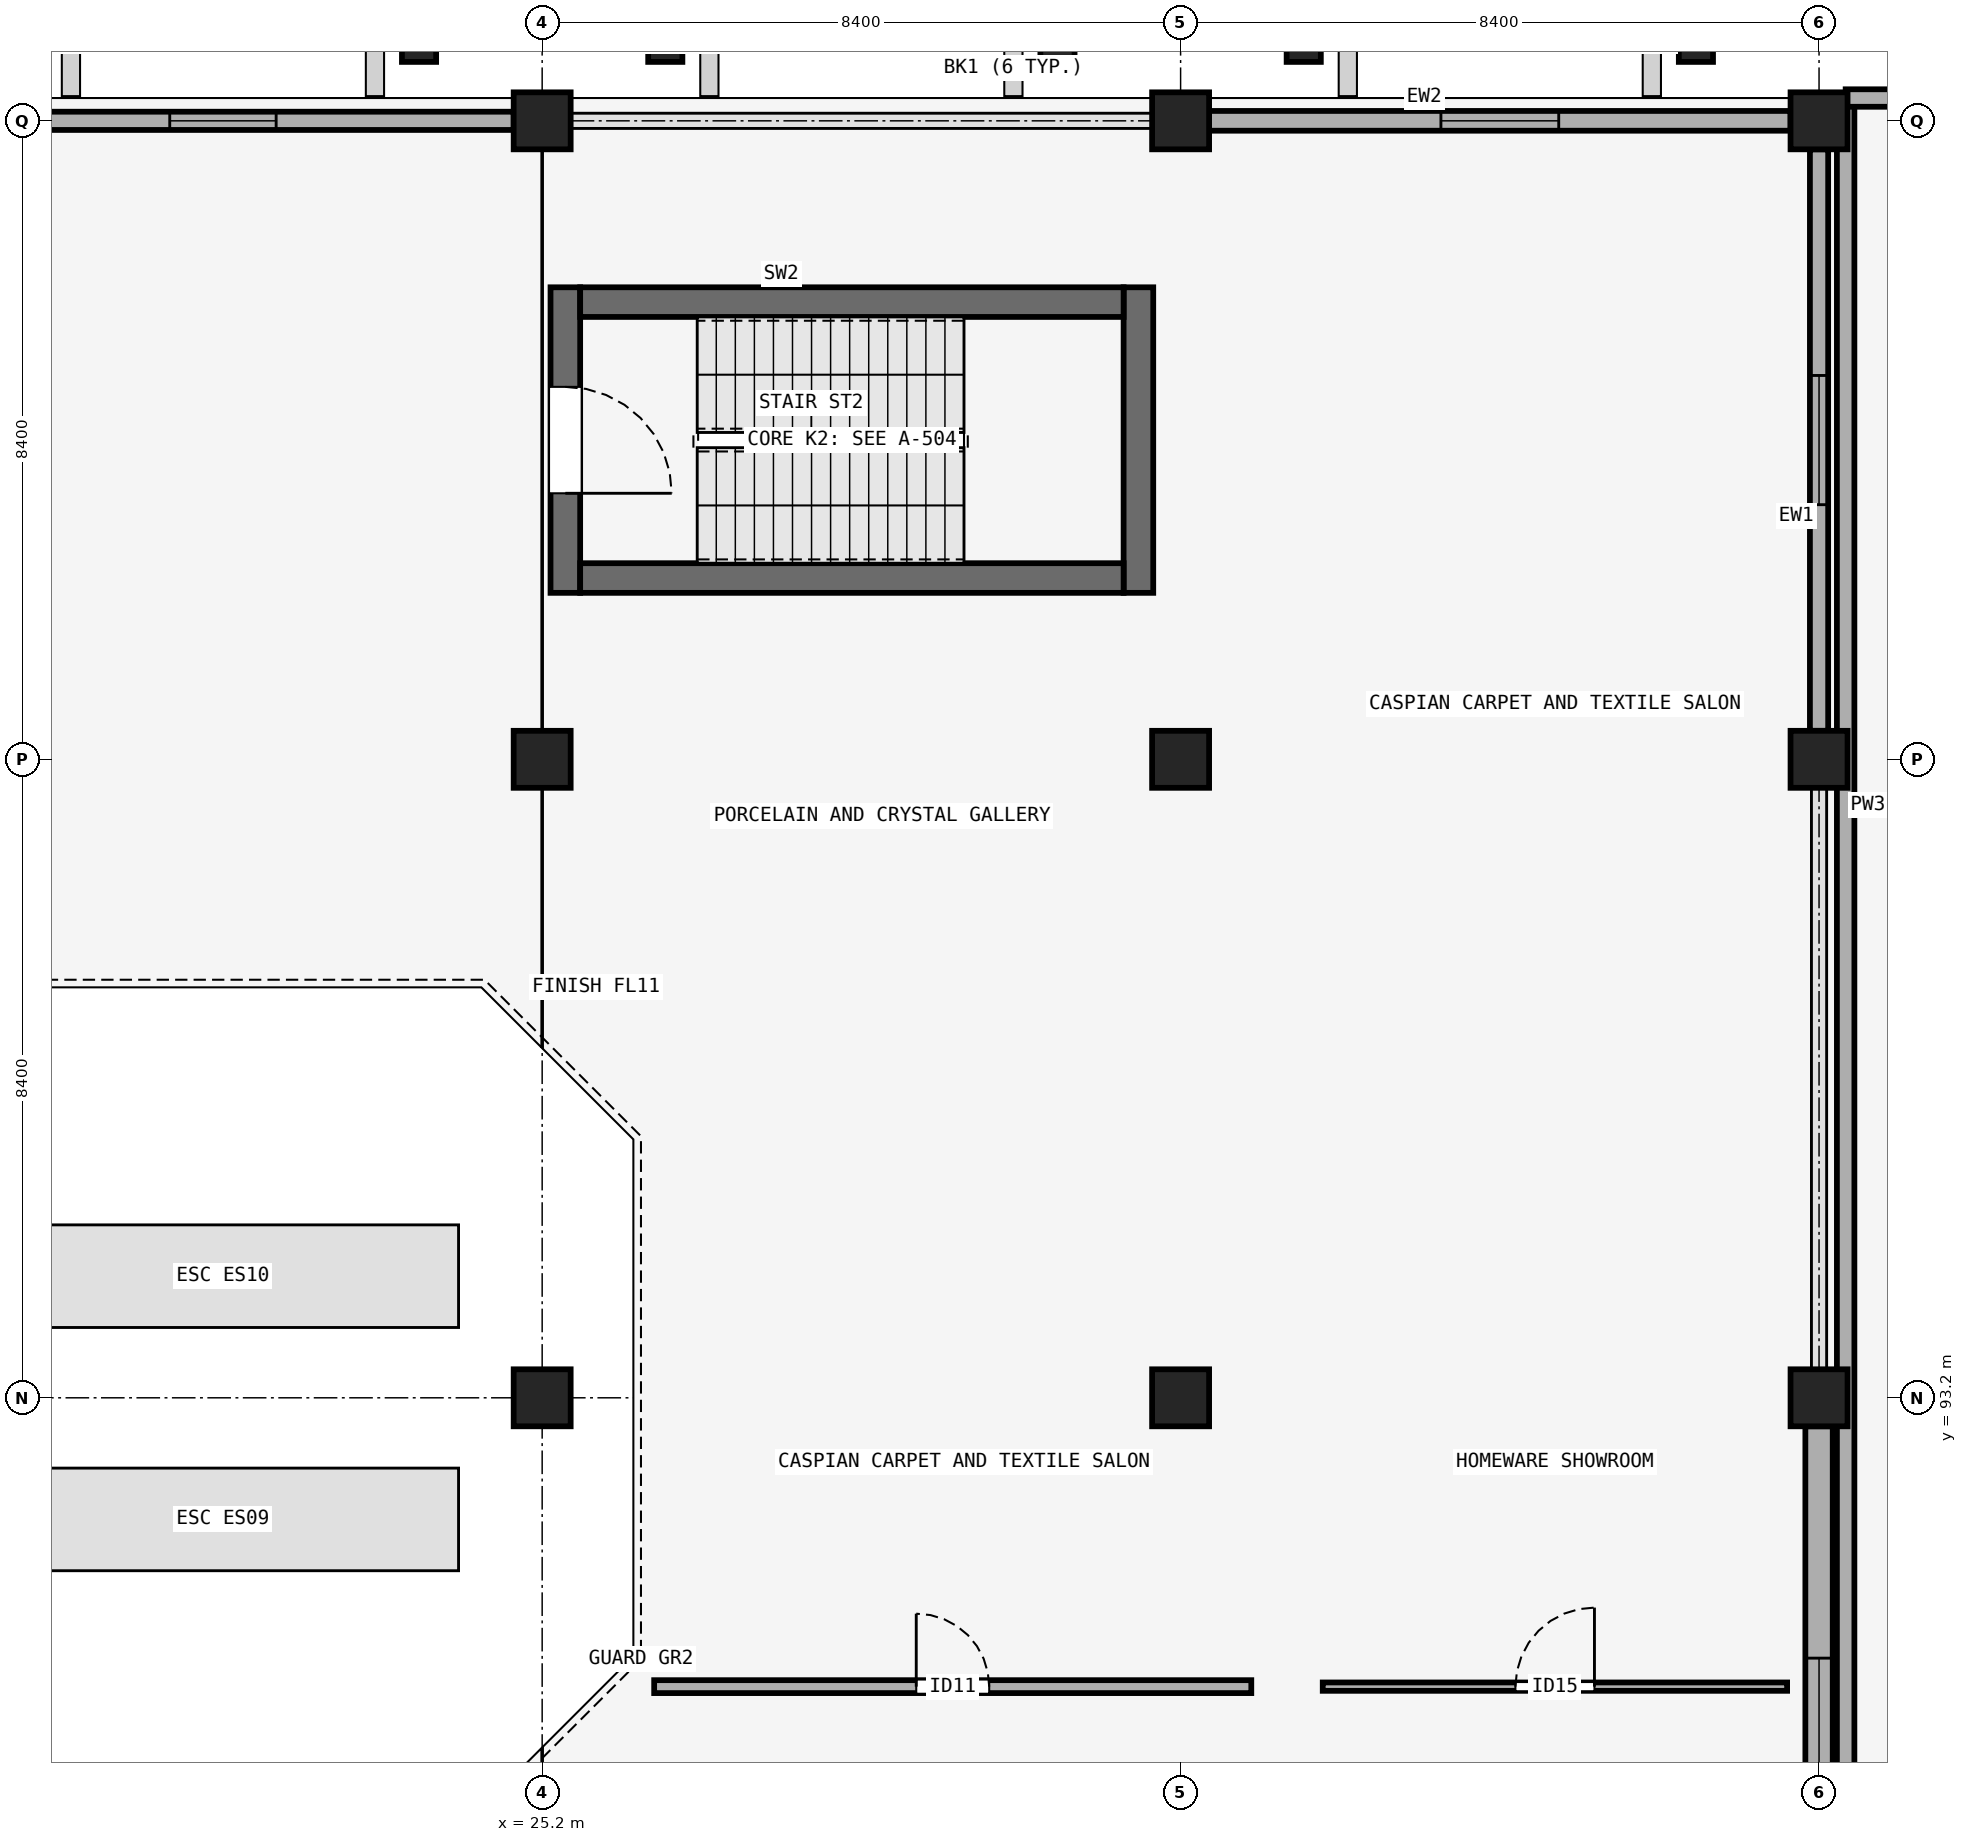
"""IFC4 building model, lengths in metres.
Left out: names, types, materials, properties, quantities, classifications, styles, units other than length and angle.
Written with IfcOpenShell. Run it as: python <this file> out.ifc"""

import sys

from ifc_helpers import new_model, si_unit, direction, frame, frame_2d, origin, origin_2d, place, context, subcontext, project, spatial, rectangle, extrude, element, fill, save


model = new_model("IFC4")
c1 = context("Model", 3, precision=1e-05, world=origin(), true_north=direction((0.0, 1.0)))
c2 = subcontext(c1, "Body", "Model", "MODEL_VIEW")
j1 = project(units=[si_unit("LENGTHUNIT", "METRE"), si_unit("PLANEANGLEUNIT", "RADIAN")], contexts=[c1])
p1 = place(None, origin())
s1 = spatial("IfcSite", under=j1, at=p1, CompositionType="ELEMENT")
p2 = place(p1, origin())
s2 = spatial("IfcBuilding", under=s1, at=p2, CompositionType="ELEMENT")
p3 = place(p2, frame((0.0, 0.0, 18.9)))
s3 = spatial("IfcBuildingStorey", under=s2, at=p3, CompositionType="ELEMENT", Elevation=18.9)
for number, where, z_axis, x_axis in (
    (1, (25.2, 93.2, 0.0), (0.0, 0.0, 1.0), (1.0, 0.0, 0.0)),
    (2, (33.6, 93.2, 0.0), (0.0, 0.0, 1.0), (1.0, 0.0, 0.0)),
    (3, (42.0, 93.2, 0.0), (0.0, 0.0, 1.0), (1.0, 0.0, 0.0)),
    (4, (25.2, 101.6, 0.0), (0.0, 0.0, 1.0), (1.0, 0.0, 0.0)),
    (5, (33.6, 101.6, 0.0), (0.0, 0.0, 1.0), (1.0, 0.0, 0.0)),
    (6, (42.0, 101.6, 0.0), (0.0, 0.0, 1.0), (1.0, 0.0, 0.0)),
    (7, (25.2, 110.0, 0.0), (0.0, 0.0, 1.0), (1.0, 0.0, 0.0)),
    (8, (33.6, 110.0, 0.0), (0.0, 0.0, 1.0), (1.0, 0.0, 0.0)),
    (9, (42.0, 110.0, 0.0), (0.0, 0.0, 1.0), (1.0, 0.0, 0.0)),
):
    element("IfcColumn", number, at=place(p3, frame(where, z_axis=z_axis, x_axis=x_axis)), inside=s3, PredefinedType="COLUMN", context=c2, shape_type="SweptSolid", body=[
        extrude(rectangle(XDim=0.75, YDim=0.75, at=origin_2d()), origin(), (0.0, 0.0, 1.0), 4.5),
    ])
for number, where, z_axis, x_axis in (
    (10, (23.58, 111.05, 0.0), (0.0, 0.0, 1.0), (1.0, 0.0, 0.0)),
    (11, (26.82, 111.05, 0.0), (0.0, 0.0, 1.0), (1.0, 0.0, 0.0)),
    (12, (31.98, 111.05, 0.0), (0.0, 0.0, 1.0), (1.0, 0.0, 0.0)),
    (13, (35.22, 111.05, 0.0), (0.0, 0.0, 1.0), (1.0, 0.0, 0.0)),
    (14, (40.38, 111.05, 0.0), (0.0, 0.0, 1.0), (1.0, 0.0, 0.0)),
):
    element("IfcColumn", number, at=place(p3, frame(where, z_axis=z_axis, x_axis=x_axis)), inside=s3, PredefinedType="PILASTER", context=c2, shape_type="SweptSolid", body=[
        extrude(rectangle(XDim=0.45, YDim=0.55, at=origin_2d()), origin(), (0.0, 0.0, 1.0), 4.5),
    ])
p4 = place(p3, frame((17.175, 110.0, 0.0), z_axis=(0.0, 0.0, 1.0), x_axis=(1.0, 0.0, 0.0)))
e15 = element("IfcWall", 15, at=p4, inside=s3, PredefinedType="SOLIDWALL", context=c2, shape_type="SweptSolid", body=[
    extrude(rectangle(XDim=7.65, YDim=0.24, at=frame_2d((3.825, 0.0))), origin(), (0.0, 0.0, 1.0), 3.45),
])
p5 = place(p4, frame((3.125, 0.0, 0.95)))
e16 = element("IfcOpeningElement", 16, at=p5, cuts=e15, PredefinedType="OPENING", context=c2, shape_type="SweptSolid", body=[
    extrude(rectangle(XDim=1.4, YDim=2.1, at=frame_2d((0.7, 1.05))), frame((0.0, 0.13, 0.0), z_axis=(0.0, -1.0, 0.0), x_axis=(1.0, 0.0, 0.0)), (0.0, 0.0, 1.0), 0.26),
])
p6 = place(p3, frame((33.975, 110.0, 0.0), z_axis=(0.0, 0.0, 1.0), x_axis=(1.0, 0.0, 0.0)))
e17 = element("IfcWall", 17, at=p6, inside=s3, PredefinedType="SOLIDWALL", context=c2, shape_type="SweptSolid", body=[
    extrude(rectangle(XDim=7.65, YDim=0.26, at=frame_2d((3.825, 0.0))), origin(), (0.0, 0.0, 1.0), 3.45),
])
p7 = place(p6, frame((3.05, 0.0, 0.95)))
e18 = element("IfcOpeningElement", 18, at=p7, cuts=e17, PredefinedType="OPENING", context=c2, shape_type="SweptSolid", body=[
    extrude(rectangle(XDim=1.55, YDim=1.35, at=frame_2d((0.775, 0.675))), frame((0.0, 0.14, 0.0), z_axis=(0.0, -1.0, 0.0), x_axis=(1.0, 0.0, 0.0)), (0.0, 0.0, 1.0), 0.28),
])
p8 = place(p3, frame((42.0, 85.175, 0.0), z_axis=(0.0, 0.0, 1.0), x_axis=(0.0, 1.0, 0.0)))
e19 = element("IfcWall", 19, at=p8, inside=s3, PredefinedType="SOLIDWALL", context=c2, shape_type="SweptSolid", body=[
    extrude(rectangle(XDim=7.65, YDim=0.36, at=frame_2d((3.825, 0.0))), origin(), (0.0, 0.0, 1.0), 3.45),
])
p9 = place(p8, frame((3.05, 0.0, 0.95)))
e20 = element("IfcOpeningElement", 20, at=p9, cuts=e19, PredefinedType="OPENING", context=c2, shape_type="SweptSolid", body=[
    extrude(rectangle(XDim=1.55, YDim=2.1, at=frame_2d((0.775, 1.05))), frame((0.0, 0.19, 0.0), z_axis=(0.0, -1.0, 0.0), x_axis=(1.0, 0.0, 0.0)), (0.0, 0.0, 1.0), 0.38),
])
p10 = place(p3, frame((42.0, 101.975, 0.0), z_axis=(0.0, 0.0, 1.0), x_axis=(0.0, 1.0, 0.0)))
e21 = element("IfcWall", 21, at=p10, inside=s3, PredefinedType="SOLIDWALL", context=c2, shape_type="SweptSolid", body=[
    extrude(rectangle(XDim=7.65, YDim=0.24, at=frame_2d((3.825, 0.0))), origin(), (0.0, 0.0, 1.0), 3.45),
])
p11 = place(p10, frame((2.975, 0.0, 0.95)))
e22 = element("IfcOpeningElement", 22, at=p11, cuts=e21, PredefinedType="OPENING", context=c2, shape_type="SweptSolid", body=[
    extrude(rectangle(XDim=1.7, YDim=1.35, at=frame_2d((0.85, 0.675))), frame((0.0, 0.13, 0.0), z_axis=(0.0, -1.0, 0.0), x_axis=(1.0, 0.0, 0.0)), (0.0, 0.0, 1.0), 0.26),
])
p12 = place(p3, frame((42.35, 110.3, 0.0), z_axis=(0.0, 0.0, 1.0), x_axis=(0.0, -1.0, 0.0)))
e23 = element("IfcWall", 23, at=p12, inside=s3, PredefinedType="PARAPET", context=c2, shape_type="SweptSolid", body=[
    extrude(rectangle(XDim=25.15, YDim=0.23, at=frame_2d((12.575, 0.0))), origin(), (0.0, 0.0, 1.0), 0.95),
])
p13 = place(p3, frame((50.7, 110.3, 0.0), z_axis=(0.0, 0.0, 1.0), x_axis=(-1.0, 0.0, 0.0)))
e24 = element("IfcWall", 24, at=p13, inside=s3, PredefinedType="PARAPET", context=c2, shape_type="SweptSolid", body=[
    extrude(rectangle(XDim=8.35, YDim=0.23, at=frame_2d((4.175, 0.0))), origin(), (0.0, 0.0, 1.0), 0.95),
])
p14 = place(p3, frame((25.505, 107.81, 0.0), z_axis=(0.0, 0.0, 1.0), x_axis=(0.0, -1.0, 0.0)))
e25 = element("IfcWall", 25, at=p14, inside=s3, PredefinedType="SHEAR", context=c2, shape_type="SweptSolid", body=[
    extrude(rectangle(XDim=4.02, YDim=0.39, at=frame_2d((2.01, 0.0))), origin(), (0.0, 0.0, 1.0), 4.2),
])
p15 = place(p14, frame((1.31, 0.0, 0.0)))
e26 = element("IfcOpeningElement", 26, at=p15, cuts=e25, PredefinedType="OPENING", context=c2, shape_type="SweptSolid", body=[
    extrude(rectangle(XDim=1.4, YDim=2.15, at=frame_2d((0.7, 1.075))), frame((0.0, 0.205, 0.0), z_axis=(0.0, -1.0, 0.0), x_axis=(1.0, 0.0, 0.0)), (0.0, 0.0, 1.0), 0.41),
])
p16 = place(p3, frame((33.045, 103.79, 0.0), z_axis=(0.0, 0.0, 1.0), x_axis=(0.0, 1.0, 0.0)))
e27 = element("IfcWall", 27, at=p16, inside=s3, PredefinedType="SHEAR", context=c2, shape_type="SweptSolid", body=[
    extrude(rectangle(XDim=4.02, YDim=0.39, at=frame_2d((2.01, 0.0))), origin(), (0.0, 0.0, 1.0), 4.2),
])
for number, where, z_axis, x_axis in (
    (28, (25.7, 103.985, 0.0), (0.0, 0.0, 1.0), (1.0, 0.0, 0.0)),
    (29, (25.7, 107.615, 0.0), (0.0, 0.0, 1.0), (1.0, 0.0, 0.0)),
):
    element("IfcWall", number, at=place(p3, frame(where, z_axis=z_axis, x_axis=x_axis)), inside=s3, PredefinedType="SHEAR", context=c2, shape_type="SweptSolid", body=[
        extrude(rectangle(XDim=7.15, YDim=0.39, at=frame_2d((3.575, 0.0))), origin(), (0.0, 0.0, 1.0), 4.2),
    ])
p17 = place(p3, frame((26.674, 89.4, 0.0), z_axis=(0.0, 0.0, 1.0), x_axis=(1.0, 0.0, 0.0)))
e30 = element("IfcWall", 30, at=p17, inside=s3, PredefinedType="PARTITIONING", context=c2, shape_type="SweptSolid", body=[
    extrude(rectangle(XDim=7.856, YDim=0.17, at=frame_2d((3.928, 0.0))), origin(), (0.0, 0.0, 1.0), 3.45),
])
p18 = place(p17, frame((3.448, 0.0, 0.0)))
e31 = element("IfcOpeningElement", 31, at=p18, cuts=e30, PredefinedType="OPENING", context=c2, shape_type="SweptSolid", body=[
    extrude(rectangle(XDim=0.96, YDim=2.1, at=frame_2d((0.48, 1.05))), frame((0.0, 0.095, 0.0), z_axis=(0.0, -1.0, 0.0), x_axis=(1.0, 0.0, 0.0)), (0.0, 0.0, 1.0), 0.19),
])
p19 = place(p3, frame((35.47, 89.4, 0.0), z_axis=(0.0, 0.0, 1.0), x_axis=(1.0, 0.0, 0.0)))
e32 = element("IfcWall", 32, at=p19, inside=s3, PredefinedType="PARTITIONING", context=c2, shape_type="SweptSolid", body=[
    extrude(rectangle(XDim=6.11, YDim=0.11, at=frame_2d((3.055, 0.0))), origin(), (0.0, 0.0, 1.0), 4.2),
])
p20 = place(p19, frame((2.535, 0.0, 0.0)))
e33 = element("IfcOpeningElement", 33, at=p20, cuts=e32, PredefinedType="OPENING", context=c2, shape_type="SweptSolid", body=[
    extrude(rectangle(XDim=1.04, YDim=2.1, at=frame_2d((0.52, 1.05))), frame((0.0, 0.065, 0.0), z_axis=(0.0, -1.0, 0.0), x_axis=(1.0, 0.0, 0.0)), (0.0, 0.0, 1.0), 0.13),
])
p21 = place(p5, origin())
e34 = element("IfcWindow", 34, at=p21, inside=s3, PartitioningType="SINGLE_PANEL", PredefinedType="WINDOW", context=c2, shape_type="SweptSolid", body=[
    extrude(rectangle(XDim=1.4, YDim=2.1, at=frame_2d((0.7, 1.05))), frame((0.0, 0.03, 0.0), z_axis=(0.0, -1.0, 0.0), x_axis=(1.0, 0.0, 0.0)), (0.0, 0.0, 1.0), 0.06),
])
fill(e16, e34)
p22 = place(p7, origin())
e35 = element("IfcWindow", 35, at=p22, inside=s3, PartitioningType="SINGLE_PANEL", PredefinedType="WINDOW", context=c2, shape_type="SweptSolid", body=[
    extrude(rectangle(XDim=1.55, YDim=1.35, at=frame_2d((0.775, 0.675))), frame((0.0, 0.03, 0.0), z_axis=(0.0, -1.0, 0.0), x_axis=(1.0, 0.0, 0.0)), (0.0, 0.0, 1.0), 0.06),
])
fill(e18, e35)
p23 = place(p9, origin())
e36 = element("IfcWindow", 36, at=p23, inside=s3, PartitioningType="SINGLE_PANEL", PredefinedType="WINDOW", context=c2, shape_type="SweptSolid", body=[
    extrude(rectangle(XDim=1.55, YDim=2.1, at=frame_2d((0.775, 1.05))), frame((0.0, 0.03, 0.0), z_axis=(0.0, -1.0, 0.0), x_axis=(1.0, 0.0, 0.0)), (0.0, 0.0, 1.0), 0.06),
])
fill(e20, e36)
p24 = place(p11, origin())
e37 = element("IfcWindow", 37, at=p24, inside=s3, PartitioningType="DOUBLE_PANEL_VERTICAL", PredefinedType="WINDOW", context=c2, shape_type="SweptSolid", body=[
    extrude(rectangle(XDim=1.7, YDim=1.35, at=frame_2d((0.85, 0.675))), frame((0.0, 0.03, 0.0), z_axis=(0.0, -1.0, 0.0), x_axis=(1.0, 0.0, 0.0)), (0.0, 0.0, 1.0), 0.06),
])
fill(e22, e37)
p25 = place(p15, origin())
e38 = element("IfcDoor", 38, at=p25, inside=s3, OperationType="SINGLE_SWING_RIGHT", PredefinedType="DOOR", context=c2, shape_type="SweptSolid", body=[
    extrude(rectangle(XDim=1.4, YDim=2.15, at=frame_2d((0.7, 1.075))), frame((0.0, 0.025, 0.0), z_axis=(0.0, -1.0, 0.0), x_axis=(1.0, 0.0, 0.0)), (0.0, 0.0, 1.0), 0.05),
])
fill(e26, e38)
p26 = place(p18, origin())
e39 = element("IfcDoor", 39, at=p26, inside=s3, OperationType="SINGLE_SWING_LEFT", PredefinedType="DOOR", context=c2, shape_type="SweptSolid", body=[
    extrude(rectangle(XDim=0.96, YDim=2.1, at=frame_2d((0.48, 1.05))), frame((0.0, 0.025, 0.0), z_axis=(0.0, -1.0, 0.0), x_axis=(1.0, 0.0, 0.0)), (0.0, 0.0, 1.0), 0.05),
])
fill(e31, e39)
p27 = place(p20, origin())
e40 = element("IfcDoor", 40, at=p27, inside=s3, OperationType="SINGLE_SWING_RIGHT", PredefinedType="DOOR", context=c2, shape_type="SweptSolid", body=[
    extrude(rectangle(XDim=1.04, YDim=2.1, at=frame_2d((0.52, 1.05))), frame((0.0, 0.025, 0.0), z_axis=(0.0, -1.0, 0.0), x_axis=(1.0, 0.0, 0.0)), (0.0, 0.0, 1.0), 0.05),
])
fill(e33, e40)
save(model, sys.argv[1])
